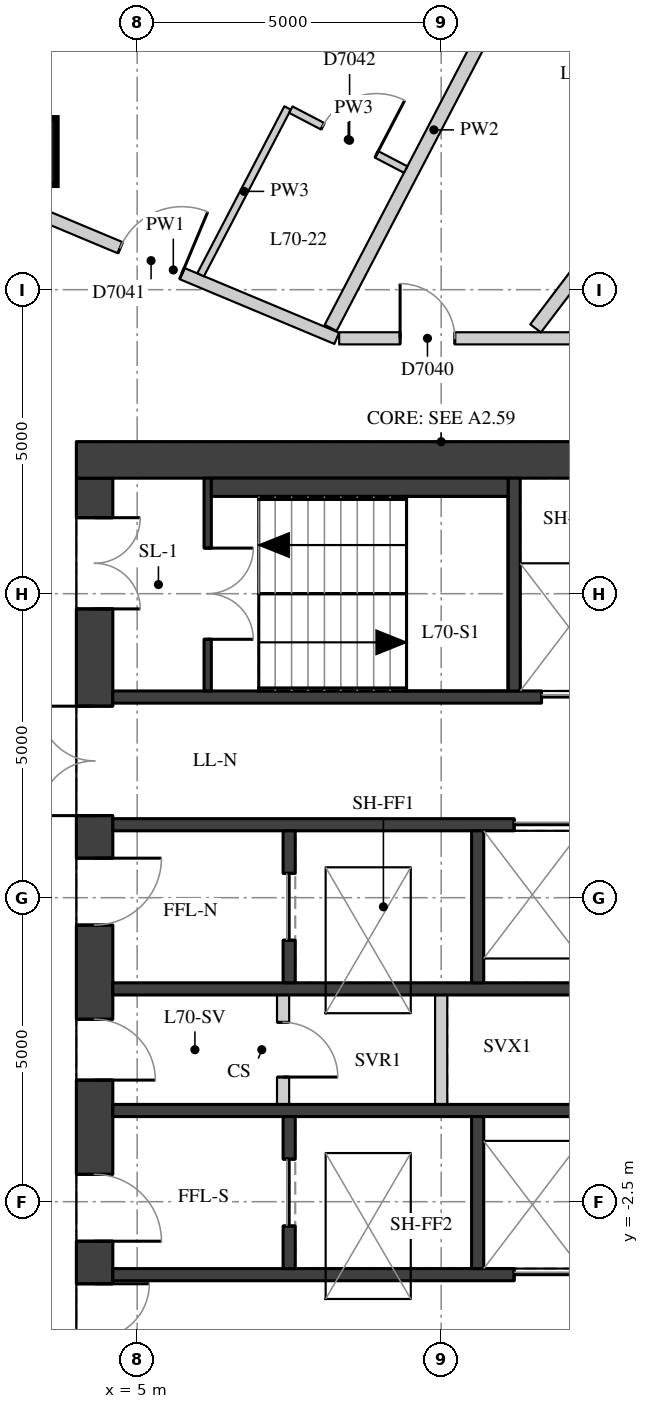
"""IFC4 building model, lengths in metres.
Left out: names, types, materials, properties, quantities, classifications, styles, units other than length and angle.
Written with IfcOpenShell. Run it as: python <this file> out.ifc"""

import sys

from ifc_helpers import new_model, si_unit, direction, frame, frame_2d, origin, origin_2d, place, context, subcontext, project, spatial, rectangle, extrude, element, fill, save


model = new_model("IFC4")
c1 = context("Model", 3, precision=1e-05, world=origin(), true_north=direction((0.0, 1.0)))
c2 = subcontext(c1, "Body", "Model", "MODEL_VIEW")
j1 = project(units=[si_unit("LENGTHUNIT", "METRE"), si_unit("PLANEANGLEUNIT", "RADIAN")], contexts=[c1])
p1 = place(None, origin())
s1 = spatial("IfcSite", under=j1, at=p1, CompositionType="ELEMENT")
p2 = place(p1, origin())
s2 = spatial("IfcBuilding", under=s1, at=p2, CompositionType="ELEMENT")
p3 = place(p2, frame((0.0, 0.0, 246.5)))
s3 = spatial("IfcBuildingStorey", under=s2, at=p3, CompositionType="ELEMENT", Elevation=246.5)
p4 = place(p3, frame((3.126, 14.772, 0.0), z_axis=(0.0, 0.0, 1.0), x_axis=(1.0, 0.0, 0.0)))
e1 = element("IfcColumn", 1, at=p4, inside=s3, PredefinedType="COLUMN", context=c2, shape_type="SweptSolid", body=[
    extrude(rectangle(XDim=1.1, YDim=1.1, at=origin_2d()), origin(), (0.0, 0.0, 1.0), 3.3),
])
p5 = place(p3, frame((4.3, -9.4, 0.0), z_axis=(0.0, 0.0, 1.0), x_axis=(0.0, 1.0, 0.0)))
e2 = element("IfcWall", 2, at=p5, inside=s3, PredefinedType="SHEAR", context=c2, shape_type="SweptSolid", body=[
    extrude(rectangle(XDim=18.8, YDim=0.6, at=frame_2d((9.4, 0.0))), origin(), (0.0, 0.0, 1.0), 3.02),
])
p6 = place(p5, frame((0.65, 0.0, 0.0)))
e3 = element("IfcOpeningElement", 3, at=p6, cuts=e2, PredefinedType="OPENING", context=c2, shape_type="SweptSolid", body=[
    extrude(rectangle(XDim=1.5, YDim=2.1, at=frame_2d((0.75, 1.05))), frame((0.0, 0.31, 0.0), z_axis=(0.0, -1.0, 0.0), x_axis=(1.0, 0.0, 0.0)), (0.0, 0.0, 1.0), 0.62),
])
p7 = place(p5, frame((3.75, 0.0, 0.0)))
e4 = element("IfcOpeningElement", 4, at=p7, cuts=e2, PredefinedType="OPENING", context=c2, shape_type="SweptSolid", body=[
    extrude(rectangle(XDim=1.8, YDim=2.1, at=frame_2d((0.9, 1.05))), frame((0.0, 0.31, 0.0), z_axis=(0.0, -1.0, 0.0), x_axis=(1.0, 0.0, 0.0)), (0.0, 0.0, 1.0), 0.62),
])
p8 = place(p5, frame((6.25, 0.0, 0.0)))
e5 = element("IfcOpeningElement", 5, at=p8, cuts=e2, PredefinedType="OPENING", context=c2, shape_type="SweptSolid", body=[
    extrude(rectangle(XDim=1.1, YDim=2.1, at=frame_2d((0.55, 1.05))), frame((0.0, 0.31, 0.0), z_axis=(0.0, -1.0, 0.0), x_axis=(1.0, 0.0, 0.0)), (0.0, 0.0, 1.0), 0.62),
])
p9 = place(p5, frame((8.9, 0.0, 0.0)))
e6 = element("IfcOpeningElement", 6, at=p9, cuts=e2, PredefinedType="OPENING", context=c2, shape_type="SweptSolid", body=[
    extrude(rectangle(XDim=1.0, YDim=2.1, at=frame_2d((0.5, 1.05))), frame((0.0, 0.31, 0.0), z_axis=(0.0, -1.0, 0.0), x_axis=(1.0, 0.0, 0.0)), (0.0, 0.0, 1.0), 0.62),
])
p10 = place(p5, frame((11.45, 0.0, 0.0)))
e7 = element("IfcOpeningElement", 7, at=p10, cuts=e2, PredefinedType="OPENING", context=c2, shape_type="SweptSolid", body=[
    extrude(rectangle(XDim=1.1, YDim=2.1, at=frame_2d((0.55, 1.05))), frame((0.0, 0.31, 0.0), z_axis=(0.0, -1.0, 0.0), x_axis=(1.0, 0.0, 0.0)), (0.0, 0.0, 1.0), 0.62),
])
p11 = place(p5, frame((13.25, 0.0, 0.0)))
e8 = element("IfcOpeningElement", 8, at=p11, cuts=e2, PredefinedType="OPENING", context=c2, shape_type="SweptSolid", body=[
    extrude(rectangle(XDim=1.8, YDim=2.1, at=frame_2d((0.9, 1.05))), frame((0.0, 0.31, 0.0), z_axis=(0.0, -1.0, 0.0), x_axis=(1.0, 0.0, 0.0)), (0.0, 0.0, 1.0), 0.62),
])
p12 = place(p5, frame((16.65, 0.0, 0.0)))
e9 = element("IfcOpeningElement", 9, at=p12, cuts=e2, PredefinedType="OPENING", context=c2, shape_type="SweptSolid", body=[
    extrude(rectangle(XDim=1.5, YDim=2.1, at=frame_2d((0.75, 1.05))), frame((0.0, 0.31, 0.0), z_axis=(0.0, -1.0, 0.0), x_axis=(1.0, 0.0, 0.0)), (0.0, 0.0, 1.0), 0.62),
])
p13 = place(p3, frame((4.0, 9.7, 0.0), z_axis=(0.0, 0.0, 1.0), x_axis=(1.0, 0.0, 0.0)))
e10 = element("IfcWall", 10, at=p13, inside=s3, PredefinedType="SHEAR", context=c2, shape_type="SweptSolid", body=[
    extrude(rectangle(XDim=12.0, YDim=0.6, at=frame_2d((6.0, 0.0))), origin(), (0.0, 0.0, 1.0), 3.02),
])
p14 = place(p3, frame((4.6, 5.8, 0.0), z_axis=(0.0, 0.0, 1.0), x_axis=(1.0, 0.0, 0.0)))
e11 = element("IfcWall", 11, at=p14, inside=s3, PredefinedType="SHEAR", context=c2, shape_type="SweptSolid", body=[
    extrude(rectangle(XDim=10.8, YDim=0.2, at=frame_2d((5.4, 0.0))), origin(), (0.0, 0.0, 1.0), 3.02),
])
p15 = place(p14, frame((7.05, 0.0, 0.0)))
e12 = element("IfcOpeningElement", 12, at=p15, cuts=e11, PredefinedType="OPENING", context=c2, shape_type="SweptSolid", body=[
    extrude(rectangle(XDim=1.1, YDim=2.1, at=frame_2d((0.55, 1.05))), frame((0.0, 0.11, 0.0), z_axis=(0.0, -1.0, 0.0), x_axis=(1.0, 0.0, 0.0)), (0.0, 0.0, 1.0), 0.22),
])
p16 = place(p14, frame((9.05, 0.0, 0.0)))
e13 = element("IfcOpeningElement", 13, at=p16, cuts=e11, PredefinedType="OPENING", context=c2, shape_type="SweptSolid", body=[
    extrude(rectangle(XDim=1.1, YDim=2.1, at=frame_2d((0.55, 1.05))), frame((0.0, 0.11, 0.0), z_axis=(0.0, -1.0, 0.0), x_axis=(1.0, 0.0, 0.0)), (0.0, 0.0, 1.0), 0.22),
])
p17 = place(p3, frame((4.6, 3.7, 0.0), z_axis=(0.0, 0.0, 1.0), x_axis=(1.0, 0.0, 0.0)))
e14 = element("IfcWall", 14, at=p17, inside=s3, PredefinedType="SHEAR", context=c2, shape_type="SweptSolid", body=[
    extrude(rectangle(XDim=10.8, YDim=0.2, at=frame_2d((5.4, 0.0))), origin(), (0.0, 0.0, 1.0), 3.02),
])
p18 = place(p17, frame((6.6, 0.0, 0.0)))
e15 = element("IfcOpeningElement", 15, at=p18, cuts=e14, PredefinedType="OPENING", context=c2, shape_type="SweptSolid", body=[
    extrude(rectangle(XDim=1.1, YDim=2.1, at=frame_2d((0.55, 1.05))), frame((0.0, 0.11, 0.0), z_axis=(0.0, -1.0, 0.0), x_axis=(1.0, 0.0, 0.0)), (0.0, 0.0, 1.0), 0.22),
])
p19 = place(p17, frame((8.9, 0.0, 0.0)))
e16 = element("IfcOpeningElement", 16, at=p19, cuts=e14, PredefinedType="OPENING", context=c2, shape_type="SweptSolid", body=[
    extrude(rectangle(XDim=1.1, YDim=2.1, at=frame_2d((0.55, 1.05))), frame((0.0, 0.11, 0.0), z_axis=(0.0, -1.0, 0.0), x_axis=(1.0, 0.0, 0.0)), (0.0, 0.0, 1.0), 0.22),
])
for number, where, z_axis, x_axis in (
    (17, (4.6, 1.0, 0.0), (0.0, 0.0, 1.0), (1.0, 0.0, 0.0)),
    (18, (4.6, -1.0, 0.0), (0.0, 0.0, 1.0), (1.0, 0.0, 0.0)),
):
    element("IfcWall", number, at=place(p3, frame(where, z_axis=z_axis, x_axis=x_axis)), inside=s3, PredefinedType="SHEAR", context=c2, shape_type="SweptSolid", body=[
        extrude(rectangle(XDim=10.8, YDim=0.2, at=frame_2d((5.4, 0.0))), origin(), (0.0, 0.0, 1.0), 3.02),
    ])
p20 = place(p3, frame((4.6, -3.7, 0.0), z_axis=(0.0, 0.0, 1.0), x_axis=(1.0, 0.0, 0.0)))
e19 = element("IfcWall", 19, at=p20, inside=s3, PredefinedType="SHEAR", context=c2, shape_type="SweptSolid", body=[
    extrude(rectangle(XDim=10.8, YDim=0.2, at=frame_2d((5.4, 0.0))), origin(), (0.0, 0.0, 1.0), 3.02),
])
p21 = place(p20, frame((6.6, 0.0, 0.0)))
e20 = element("IfcOpeningElement", 20, at=p21, cuts=e19, PredefinedType="OPENING", context=c2, shape_type="SweptSolid", body=[
    extrude(rectangle(XDim=1.1, YDim=2.1, at=frame_2d((0.55, 1.05))), frame((0.0, 0.11, 0.0), z_axis=(0.0, -1.0, 0.0), x_axis=(1.0, 0.0, 0.0)), (0.0, 0.0, 1.0), 0.22),
])
p22 = place(p20, frame((8.9, 0.0, 0.0)))
e21 = element("IfcOpeningElement", 21, at=p22, cuts=e19, PredefinedType="OPENING", context=c2, shape_type="SweptSolid", body=[
    extrude(rectangle(XDim=1.1, YDim=2.1, at=frame_2d((0.55, 1.05))), frame((0.0, 0.11, 0.0), z_axis=(0.0, -1.0, 0.0), x_axis=(1.0, 0.0, 0.0)), (0.0, 0.0, 1.0), 0.22),
])
p23 = place(p3, frame((11.2, 5.9, 0.0), z_axis=(0.0, 0.0, 1.0), x_axis=(0.0, 1.0, 0.0)))
e22 = element("IfcWall", 22, at=p23, inside=s3, PredefinedType="SHEAR", context=c2, shape_type="SweptSolid", body=[
    extrude(rectangle(XDim=3.5, YDim=0.2, at=frame_2d((1.75, 0.0))), origin(), (0.0, 0.0, 1.0), 3.02),
])
p24 = place(p3, frame((7.5, 1.1, 0.0), z_axis=(0.0, 0.0, 1.0), x_axis=(0.0, 1.0, 0.0)))
e23 = element("IfcWall", 23, at=p24, inside=s3, PredefinedType="SHEAR", context=c2, shape_type="SweptSolid", body=[
    extrude(rectangle(XDim=2.5, YDim=0.2, at=frame_2d((1.25, 0.0))), origin(), (0.0, 0.0, 1.0), 3.02),
])
p25 = place(p24, frame((0.7, 0.0, 0.0)))
e24 = element("IfcOpeningElement", 24, at=p25, cuts=e23, PredefinedType="OPENING", context=c2, shape_type="SweptSolid", body=[
    extrude(rectangle(XDim=1.1, YDim=2.1, at=frame_2d((0.55, 1.05))), frame((0.0, 0.11, 0.0), z_axis=(0.0, -1.0, 0.0), x_axis=(1.0, 0.0, 0.0)), (0.0, 0.0, 1.0), 0.22),
])
p26 = place(p3, frame((7.5, -3.6, 0.0), z_axis=(0.0, 0.0, 1.0), x_axis=(0.0, 1.0, 0.0)))
e25 = element("IfcWall", 25, at=p26, inside=s3, PredefinedType="SHEAR", context=c2, shape_type="SweptSolid", body=[
    extrude(rectangle(XDim=2.5, YDim=0.2, at=frame_2d((1.25, 0.0))), origin(), (0.0, 0.0, 1.0), 3.02),
])
p27 = place(p26, frame((0.7, 0.0, 0.0)))
e26 = element("IfcOpeningElement", 26, at=p27, cuts=e25, PredefinedType="OPENING", context=c2, shape_type="SweptSolid", body=[
    extrude(rectangle(XDim=1.1, YDim=2.1, at=frame_2d((0.55, 1.05))), frame((0.0, 0.11, 0.0), z_axis=(0.0, -1.0, 0.0), x_axis=(1.0, 0.0, 0.0)), (0.0, 0.0, 1.0), 0.22),
])
for number, where, z_axis, x_axis in (
    (27, (10.6, 1.1, 0.0), (0.0, 0.0, 1.0), (0.0, 1.0, 0.0)),
    (28, (10.6, -3.6, 0.0), (0.0, 0.0, 1.0), (0.0, 1.0, 0.0)),
):
    element("IfcWall", number, at=place(p3, frame(where, z_axis=z_axis, x_axis=x_axis)), inside=s3, PredefinedType="SHEAR", context=c2, shape_type="SweptSolid", body=[
        extrude(rectangle(XDim=2.5, YDim=0.2, at=frame_2d((1.25, 0.0))), origin(), (0.0, 0.0, 1.0), 3.02),
    ])
p28 = place(p3, frame((6.16, 5.9, 0.0), z_axis=(0.0, 0.0, 1.0), x_axis=(0.0, 1.0, 0.0)))
e29 = element("IfcWall", 29, at=p28, inside=s3, PredefinedType="SHEAR", context=c2, shape_type="SweptSolid", body=[
    extrude(rectangle(XDim=3.5, YDim=0.12, at=frame_2d((1.75, 0.0))), origin(), (0.0, 0.0, 1.0), 3.02),
])
p29 = place(p28, frame((0.85, 0.0, 0.0)))
e30 = element("IfcOpeningElement", 30, at=p29, cuts=e29, PredefinedType="OPENING", context=c2, shape_type="SweptSolid", body=[
    extrude(rectangle(XDim=1.5, YDim=2.1, at=frame_2d((0.75, 1.05))), frame((0.0, 0.07, 0.0), z_axis=(0.0, -1.0, 0.0), x_axis=(1.0, 0.0, 0.0)), (0.0, 0.0, 1.0), 0.14),
])
p30 = place(p3, frame((7.4, -0.9, 0.0), z_axis=(0.0, 0.0, 1.0), x_axis=(0.0, 1.0, 0.0)))
e31 = element("IfcWall", 31, at=p30, inside=s3, PredefinedType="PARTITIONING", context=c2, shape_type="SweptSolid", body=[
    extrude(rectangle(XDim=1.8, YDim=0.2, at=frame_2d((0.9, 0.0))), origin(), (0.0, 0.0, 1.0), 3.02),
])
p31 = place(p30, frame((0.45, 0.0, 0.0)))
e32 = element("IfcOpeningElement", 32, at=p31, cuts=e31, PredefinedType="OPENING", context=c2, shape_type="SweptSolid", body=[
    extrude(rectangle(XDim=0.9, YDim=2.1, at=frame_2d((0.45, 1.05))), frame((0.0, 0.11, 0.0), z_axis=(0.0, -1.0, 0.0), x_axis=(1.0, 0.0, 0.0)), (0.0, 0.0, 1.0), 0.22),
])
p32 = place(p3, frame((10.0, -0.9, 0.0), z_axis=(0.0, 0.0, 1.0), x_axis=(0.0, 1.0, 0.0)))
e33 = element("IfcWall", 33, at=p32, inside=s3, PredefinedType="PARTITIONING", context=c2, shape_type="SweptSolid", body=[
    extrude(rectangle(XDim=1.8, YDim=0.2, at=frame_2d((0.9, 0.0))), origin(), (0.0, 0.0, 1.0), 3.02),
])
p33 = place(p3, frame((6.22, 9.25, 0.0), z_axis=(0.0, 0.0, 1.0), x_axis=(1.0, 0.0, 0.0)))
e34 = element("IfcWall", 34, at=p33, inside=s3, PredefinedType="PARTITIONING", context=c2, shape_type="SweptSolid", body=[
    extrude(rectangle(XDim=4.88, YDim=0.3, at=frame_2d((2.44, 0.0))), origin(), (0.0, 0.0, 1.0), 3.02),
])
p34 = place(p3, frame((2.907, 13.95, 0.0), z_axis=(0.0, 0.0, 1.0), x_axis=(0.922453481254, -0.386108242494, 0.0)))
e35 = element("IfcWall", 35, at=p34, inside=s3, PredefinedType="PARTITIONING", context=c2, shape_type="SweptSolid", body=[
    extrude(rectangle(XDim=5.827, YDim=0.2, at=frame_2d((2.914, 0.0))), origin(), (0.0, 0.0, 1.0), 3.02),
])
p35 = place(p34, frame((1.968, 0.0, 0.0)))
e36 = element("IfcOpeningElement", 36, at=p35, cuts=e35, PredefinedType="OPENING", context=c2, shape_type="SweptSolid", body=[
    extrude(rectangle(XDim=1.1, YDim=2.1, at=frame_2d((0.55, 1.05))), frame((0.0, 0.11, 0.0), z_axis=(0.0, -1.0, 0.0), x_axis=(1.0, 0.0, 0.0)), (0.0, 0.0, 1.0), 0.22),
])
p36 = place(p3, frame((8.322, 11.7, 0.0), z_axis=(0.0, 0.0, 1.0), x_axis=(1.0, 0.0, 0.0)))
e37 = element("IfcWall", 37, at=p36, inside=s3, PredefinedType="PARTITIONING", context=c2, shape_type="SweptSolid", body=[
    extrude(rectangle(XDim=9.378, YDim=0.2, at=frame_2d((4.689, 0.0))), origin(), (0.0, 0.0, 1.0), 3.02),
])
p37 = place(p36, frame((1.002, 0.0, 0.0)))
e38 = element("IfcOpeningElement", 38, at=p37, cuts=e37, PredefinedType="OPENING", context=c2, shape_type="SweptSolid", body=[
    extrude(rectangle(XDim=0.9, YDim=2.1, at=frame_2d((0.45, 1.05))), frame((0.0, 0.11, 0.0), z_axis=(0.0, -1.0, 0.0), x_axis=(1.0, 0.0, 0.0)), (0.0, 0.0, 1.0), 0.22),
])
p38 = place(p3, frame((14.906, 16.287, 0.0), z_axis=(0.0, 0.0, 1.0), x_axis=(-0.604066831727, -0.796933662739, 0.0)))
e39 = element("IfcWall", 39, at=p38, inside=s3, PredefinedType="PARTITIONING", context=c2, shape_type="SweptSolid", body=[
    extrude(rectangle(XDim=5.551, YDim=0.22, at=frame_2d((2.775, 0.0))), origin(), (0.0, 0.0, 1.0), 3.02),
])
p39 = place(p3, frame((11.578, 18.385, 0.0), z_axis=(0.0, 0.0, 1.0), x_axis=(-0.462372875873, -0.886685583314, 0.0)))
e40 = element("IfcWall", 40, at=p39, inside=s3, PredefinedType="PARTITIONING", context=c2, shape_type="SweptSolid", body=[
    extrude(rectangle(XDim=7.345, YDim=0.22, at=frame_2d((3.672, 0.0))), origin(), (0.0, 0.0, 1.0), 3.02),
])
p40 = place(p3, frame((3.958, 20.88, 0.0), z_axis=(0.0, 0.0, 1.0), x_axis=(-0.157259964952, -0.987557240581, 0.0)))
e41 = element("IfcWall", 41, at=p40, inside=s3, PredefinedType="PARTITIONING", context=c2, shape_type="SweptSolid", body=[
    extrude(rectangle(XDim=6.908, YDim=0.22, at=frame_2d((3.454, 0.0))), origin(), (0.0, 0.0, 1.0), 2.57),
])
p41 = place(p3, frame((6.044, 12.745, 0.0), z_axis=(0.0, 0.0, 1.0), x_axis=(0.462331372195, 0.886707224672, 0.0)))
e42 = element("IfcWall", 42, at=p41, inside=s3, PredefinedType="PARTITIONING", context=c2, shape_type="SweptSolid", body=[
    extrude(rectangle(XDim=3.094, YDim=0.12, at=frame_2d((1.547, 0.0))), origin(), (0.0, 0.0, 1.0), 3.02),
])
p42 = place(p3, frame((7.527, 15.461, 0.0), z_axis=(0.0, 0.0, 1.0), x_axis=(0.88668701022, -0.462370139507, 0.0)))
e43 = element("IfcWall", 43, at=p42, inside=s3, PredefinedType="PARTITIONING", context=c2, shape_type="SweptSolid", body=[
    extrude(rectangle(XDim=2.13, YDim=0.12, at=frame_2d((1.065, 0.0))), origin(), (0.0, 0.0, 1.0), 3.02),
])
p43 = place(p42, frame((0.59, 0.0, 0.0)))
e44 = element("IfcOpeningElement", 44, at=p43, cuts=e43, PredefinedType="OPENING", context=c2, shape_type="SweptSolid", body=[
    extrude(rectangle(XDim=1.0, YDim=2.1, at=frame_2d((0.5, 1.05))), frame((0.0, 0.07, 0.0), z_axis=(0.0, -1.0, 0.0), x_axis=(1.0, 0.0, 0.0)), (0.0, 0.0, 1.0), 0.14),
])
p44 = place(p7, origin())
e45 = element("IfcDoor", 45, at=p44, inside=s3, OperationType="DOUBLE_DOOR_SINGLE_SWING", PredefinedType="DOOR", context=c2, shape_type="SweptSolid", body=[
    extrude(rectangle(XDim=1.8, YDim=2.1, at=frame_2d((0.9, 1.05))), frame((0.0, 0.025, 0.0), z_axis=(0.0, -1.0, 0.0), x_axis=(1.0, 0.0, 0.0)), (0.0, 0.0, 1.0), 0.05),
])
fill(e4, e45)
p45 = place(p8, origin())
e46 = element("IfcDoor", 46, at=p45, inside=s3, OperationType="SINGLE_SWING_RIGHT", PredefinedType="DOOR", context=c2, shape_type="SweptSolid", body=[
    extrude(rectangle(XDim=1.1, YDim=2.1, at=frame_2d((0.55, 1.05))), frame((0.0, 0.025, 0.0), z_axis=(0.0, -1.0, 0.0), x_axis=(1.0, 0.0, 0.0)), (0.0, 0.0, 1.0), 0.05),
])
fill(e5, e46)
p46 = place(p9, origin())
e47 = element("IfcDoor", 47, at=p46, inside=s3, OperationType="SINGLE_SWING_RIGHT", PredefinedType="DOOR", context=c2, shape_type="SweptSolid", body=[
    extrude(rectangle(XDim=1.0, YDim=2.1, at=frame_2d((0.5, 1.05))), frame((0.0, 0.025, 0.0), z_axis=(0.0, -1.0, 0.0), x_axis=(1.0, 0.0, 0.0)), (0.0, 0.0, 1.0), 0.05),
])
fill(e6, e47)
p47 = place(p10, origin())
e48 = element("IfcDoor", 48, at=p47, inside=s3, OperationType="SINGLE_SWING_LEFT", PredefinedType="DOOR", context=c2, shape_type="SweptSolid", body=[
    extrude(rectangle(XDim=1.1, YDim=2.1, at=frame_2d((0.55, 1.05))), frame((0.0, 0.025, 0.0), z_axis=(0.0, -1.0, 0.0), x_axis=(1.0, 0.0, 0.0)), (0.0, 0.0, 1.0), 0.05),
])
fill(e7, e48)
p48 = place(p11, origin())
e49 = element("IfcDoor", 49, at=p48, inside=s3, OperationType="DOUBLE_DOOR_SINGLE_SWING", PredefinedType="DOOR", context=c2, shape_type="SweptSolid", body=[
    extrude(rectangle(XDim=1.8, YDim=2.1, at=frame_2d((0.9, 1.05))), frame((0.0, 0.025, 0.0), z_axis=(0.0, -1.0, 0.0), x_axis=(1.0, 0.0, 0.0)), (0.0, 0.0, 1.0), 0.05),
])
fill(e8, e49)
p49 = place(p12, origin())
e50 = element("IfcDoor", 50, at=p49, inside=s3, OperationType="DOUBLE_DOOR_SINGLE_SWING", PredefinedType="DOOR", context=c2, shape_type="SweptSolid", body=[
    extrude(rectangle(XDim=1.5, YDim=2.1, at=frame_2d((0.75, 1.05))), frame((0.0, 0.025, 0.0), z_axis=(0.0, -1.0, 0.0), x_axis=(1.0, 0.0, 0.0)), (0.0, 0.0, 1.0), 0.05),
])
fill(e9, e50)
p50 = place(p29, origin())
e51 = element("IfcDoor", 51, at=p50, inside=s3, OperationType="DOUBLE_DOOR_SINGLE_SWING", PredefinedType="DOOR", context=c2, shape_type="SweptSolid", body=[
    extrude(rectangle(XDim=1.5, YDim=2.1, at=frame_2d((0.75, 1.05))), frame((0.0, 0.025, 0.0), z_axis=(0.0, -1.0, 0.0), x_axis=(1.0, 0.0, 0.0)), (0.0, 0.0, 1.0), 0.05),
])
fill(e30, e51)
p51 = place(p15, origin())
e52 = element("IfcDoor", 52, at=p51, inside=s3, OperationType="DOUBLE_DOOR_SLIDING", PredefinedType="DOOR", context=c2, shape_type="SweptSolid", body=[
    extrude(rectangle(XDim=1.1, YDim=2.1, at=frame_2d((0.55, 1.05))), frame((0.0, 0.025, 0.0), z_axis=(0.0, -1.0, 0.0), x_axis=(1.0, 0.0, 0.0)), (0.0, 0.0, 1.0), 0.05),
])
fill(e12, e52)
p52 = place(p18, origin())
e53 = element("IfcDoor", 53, at=p52, inside=s3, OperationType="DOUBLE_DOOR_SLIDING", PredefinedType="DOOR", context=c2, shape_type="SweptSolid", body=[
    extrude(rectangle(XDim=1.1, YDim=2.1, at=frame_2d((0.55, 1.05))), frame((0.0, 0.025, 0.0), z_axis=(0.0, -1.0, 0.0), x_axis=(1.0, 0.0, 0.0)), (0.0, 0.0, 1.0), 0.05),
])
fill(e15, e53)
p53 = place(p21, origin())
e54 = element("IfcDoor", 54, at=p53, inside=s3, OperationType="DOUBLE_DOOR_SLIDING", PredefinedType="DOOR", context=c2, shape_type="SweptSolid", body=[
    extrude(rectangle(XDim=1.1, YDim=2.1, at=frame_2d((0.55, 1.05))), frame((0.0, 0.025, 0.0), z_axis=(0.0, -1.0, 0.0), x_axis=(1.0, 0.0, 0.0)), (0.0, 0.0, 1.0), 0.05),
])
fill(e20, e54)
p54 = place(p25, origin())
e55 = element("IfcDoor", 55, at=p54, inside=s3, OperationType="DOUBLE_DOOR_SLIDING", PredefinedType="DOOR", context=c2, shape_type="SweptSolid", body=[
    extrude(rectangle(XDim=1.1, YDim=2.1, at=frame_2d((0.55, 1.05))), frame((0.0, 0.025, 0.0), z_axis=(0.0, -1.0, 0.0), x_axis=(1.0, 0.0, 0.0)), (0.0, 0.0, 1.0), 0.05),
])
fill(e24, e55)
p55 = place(p27, origin())
e56 = element("IfcDoor", 56, at=p55, inside=s3, OperationType="DOUBLE_DOOR_SLIDING", PredefinedType="DOOR", context=c2, shape_type="SweptSolid", body=[
    extrude(rectangle(XDim=1.1, YDim=2.1, at=frame_2d((0.55, 1.05))), frame((0.0, 0.025, 0.0), z_axis=(0.0, -1.0, 0.0), x_axis=(1.0, 0.0, 0.0)), (0.0, 0.0, 1.0), 0.05),
])
fill(e26, e56)
p56 = place(p31, origin())
e57 = element("IfcDoor", 57, at=p56, inside=s3, OperationType="SINGLE_SWING_RIGHT", PredefinedType="DOOR", context=c2, shape_type="SweptSolid", body=[
    extrude(rectangle(XDim=0.9, YDim=2.1, at=frame_2d((0.45, 1.05))), frame((0.0, 0.025, 0.0), z_axis=(0.0, -1.0, 0.0), x_axis=(1.0, 0.0, 0.0)), (0.0, 0.0, 1.0), 0.05),
])
fill(e32, e57)
p57 = place(p37, origin())
e58 = element("IfcDoor", 58, at=p57, inside=s3, OperationType="SINGLE_SWING_LEFT", PredefinedType="DOOR", context=c2, shape_type="SweptSolid", body=[
    extrude(rectangle(XDim=0.9, YDim=2.1, at=frame_2d((0.45, 1.05))), frame((0.0, 0.025, 0.0), z_axis=(0.0, -1.0, 0.0), x_axis=(1.0, 0.0, 0.0)), (0.0, 0.0, 1.0), 0.05),
])
fill(e38, e58)
p58 = place(p35, origin())
e59 = element("IfcDoor", 59, at=p58, inside=s3, OperationType="SINGLE_SWING_RIGHT", PredefinedType="DOOR", context=c2, shape_type="SweptSolid", body=[
    extrude(rectangle(XDim=1.1, YDim=2.1, at=frame_2d((0.55, 1.05))), frame((0.0, 0.025, 0.0), z_axis=(0.0, -1.0, 0.0), x_axis=(1.0, 0.0, 0.0)), (0.0, 0.0, 1.0), 0.05),
])
fill(e36, e59)
p59 = place(p43, origin())
e60 = element("IfcDoor", 60, at=p59, inside=s3, OperationType="SINGLE_SWING_RIGHT", PredefinedType="DOOR", context=c2, shape_type="SweptSolid", body=[
    extrude(rectangle(XDim=1.0, YDim=2.1, at=frame_2d((0.5, 1.05))), frame((0.0, 0.025, 0.0), z_axis=(0.0, -1.0, 0.0), x_axis=(1.0, 0.0, 0.0)), (0.0, 0.0, 1.0), 0.05),
])
fill(e44, e60)
save(model, sys.argv[1])
